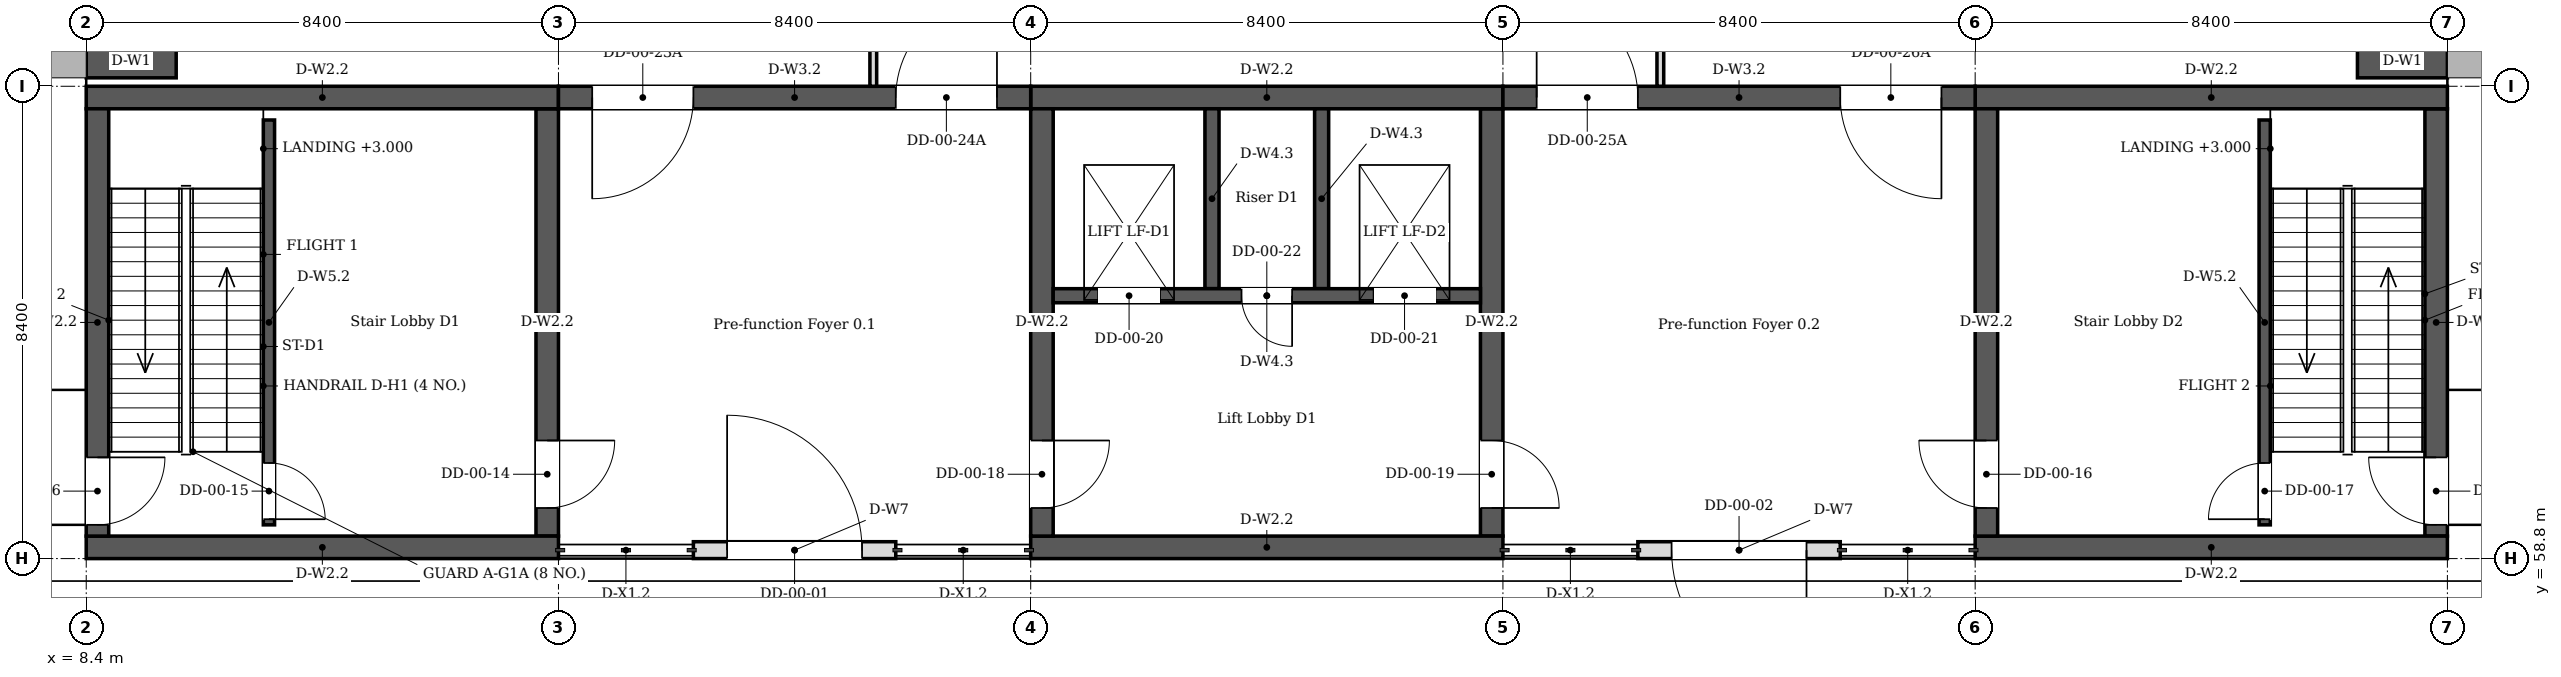
"""IFC4 building model, lengths in metres.
Left out: names, types, materials, properties, quantities, classifications, styles, units other than length and angle.
Written with IfcOpenShell. Run it as: python <this file> out.ifc"""

import sys

from ifc_helpers import new_model, si_unit, direction, frame, frame_2d, origin, place, context, subcontext, project, spatial, rectangle, extrude, element, fill, save


model = new_model("IFC4")
c1 = context("Model", 3, precision=1e-05, world=origin(), true_north=direction((0.0, 1.0)))
c2 = subcontext(c1, "Body", "Model", "MODEL_VIEW")
j1 = project(units=[si_unit("LENGTHUNIT", "METRE"), si_unit("PLANEANGLEUNIT", "RADIAN")], contexts=[c1])
p1 = place(None, origin())
s1 = spatial("IfcSite", under=j1, at=p1, CompositionType="ELEMENT")
p2 = place(p1, origin())
s2 = spatial("IfcBuilding", under=s1, at=p2, CompositionType="ELEMENT")
p3 = place(p2, origin())
s3 = spatial("IfcBuildingStorey", under=s2, at=p3, CompositionType="ELEMENT", Elevation=0.0)
p4 = place(p3, frame((8.4, 67.65, 0.0), z_axis=(0.0, 0.0, 1.0), x_axis=(1.0, 0.0, 0.0)))
e1 = element("IfcWall", 1, at=p4, inside=s3, PredefinedType="SOLIDWALL", context=c2, shape_type="SweptSolid", body=[
    extrude(rectangle(XDim=1.6, YDim=0.6, at=frame_2d((0.8, 0.0))), origin(), (0.0, 0.0, 1.0), 14.467),
])
p5 = place(p3, frame((50.4, 67.65, 0.0), z_axis=(0.0, 0.0, 1.0), x_axis=(-1.0, 0.0, 0.0)))
e2 = element("IfcWall", 2, at=p5, inside=s3, PredefinedType="SOLIDWALL", context=c2, shape_type="SweptSolid", body=[
    extrude(rectangle(XDim=1.6, YDim=0.6, at=frame_2d((0.8, 0.0))), origin(), (0.0, 0.0, 1.0), 14.467),
])
for number, where, z_axis, x_axis in (
    (3, (8.4, 59.0, 0.0), (0.0, 0.0, 1.0), (1.0, 0.0, 0.0)),
    (4, (8.4, 67.0, 0.0), (0.0, 0.0, 1.0), (1.0, 0.0, 0.0)),
):
    element("IfcWall", number, at=place(p3, frame(where, z_axis=z_axis, x_axis=x_axis)), inside=s3, PredefinedType="SOLIDWALL", context=c2, shape_type="SweptSolid", body=[
        extrude(rectangle(XDim=8.4, YDim=0.4, at=frame_2d((4.2, 0.0))), origin(), (0.0, 0.0, 1.0), 5.72),
    ])
p6 = place(p3, frame((8.6, 59.2, 0.0), z_axis=(0.0, 0.0, 1.0), x_axis=(0.0, 1.0, 0.0)))
e5 = element("IfcWall", 5, at=p6, inside=s3, PredefinedType="SOLIDWALL", context=c2, shape_type="SweptSolid", body=[
    extrude(rectangle(XDim=7.6, YDim=0.4, at=frame_2d((3.8, 0.0))), origin(), (0.0, 0.0, 1.0), 5.72),
])
p7 = place(p6, frame((0.2, 0.0, 0.0)))
e6 = element("IfcOpeningElement", 6, at=p7, cuts=e5, PredefinedType="OPENING", context=c2, shape_type="SweptSolid", body=[
    extrude(rectangle(XDim=1.2, YDim=2.1, at=frame_2d((0.6, 1.05))), frame((0.0, 0.21, 0.0), z_axis=(0.0, -1.0, 0.0), x_axis=(1.0, 0.0, 0.0)), (0.0, 0.0, 1.0), 0.42),
])
p8 = place(p3, frame((16.6, 59.2, 0.0), z_axis=(0.0, 0.0, 1.0), x_axis=(0.0, 1.0, 0.0)))
e7 = element("IfcWall", 7, at=p8, inside=s3, PredefinedType="SOLIDWALL", context=c2, shape_type="SweptSolid", body=[
    extrude(rectangle(XDim=7.6, YDim=0.4, at=frame_2d((3.8, 0.0))), origin(), (0.0, 0.0, 1.0), 5.72),
])
p9 = place(p8, frame((0.5, 0.0, 0.0)))
e8 = element("IfcOpeningElement", 8, at=p9, cuts=e7, PredefinedType="OPENING", context=c2, shape_type="SweptSolid", body=[
    extrude(rectangle(XDim=1.2, YDim=2.1, at=frame_2d((0.6, 1.05))), frame((0.0, 0.21, 0.0), z_axis=(0.0, -1.0, 0.0), x_axis=(1.0, 0.0, 0.0)), (0.0, 0.0, 1.0), 0.42),
])
for number, where, z_axis, x_axis in (
    (9, (25.2, 59.0, 0.0), (0.0, 0.0, 1.0), (1.0, 0.0, 0.0)),
    (10, (25.2, 67.0, 0.0), (0.0, 0.0, 1.0), (1.0, 0.0, 0.0)),
):
    element("IfcWall", number, at=place(p3, frame(where, z_axis=z_axis, x_axis=x_axis)), inside=s3, PredefinedType="SOLIDWALL", context=c2, shape_type="SweptSolid", body=[
        extrude(rectangle(XDim=8.4, YDim=0.4, at=frame_2d((4.2, 0.0))), origin(), (0.0, 0.0, 1.0), 5.72),
    ])
p10 = place(p3, frame((25.4, 59.2, 0.0), z_axis=(0.0, 0.0, 1.0), x_axis=(0.0, 1.0, 0.0)))
e11 = element("IfcWall", 11, at=p10, inside=s3, PredefinedType="SOLIDWALL", context=c2, shape_type="SweptSolid", body=[
    extrude(rectangle(XDim=7.6, YDim=0.4, at=frame_2d((3.8, 0.0))), origin(), (0.0, 0.0, 1.0), 5.72),
])
p11 = place(p10, frame((0.5, 0.0, 0.0)))
e12 = element("IfcOpeningElement", 12, at=p11, cuts=e11, PredefinedType="OPENING", context=c2, shape_type="SweptSolid", body=[
    extrude(rectangle(XDim=1.2, YDim=2.1, at=frame_2d((0.6, 1.05))), frame((0.0, 0.21, 0.0), z_axis=(0.0, -1.0, 0.0), x_axis=(1.0, 0.0, 0.0)), (0.0, 0.0, 1.0), 0.42),
])
p12 = place(p3, frame((33.4, 59.2, 0.0), z_axis=(0.0, 0.0, 1.0), x_axis=(0.0, 1.0, 0.0)))
e13 = element("IfcWall", 13, at=p12, inside=s3, PredefinedType="SOLIDWALL", context=c2, shape_type="SweptSolid", body=[
    extrude(rectangle(XDim=7.6, YDim=0.4, at=frame_2d((3.8, 0.0))), origin(), (0.0, 0.0, 1.0), 5.72),
])
p13 = place(p12, frame((0.5, 0.0, 0.0)))
e14 = element("IfcOpeningElement", 14, at=p13, cuts=e13, PredefinedType="OPENING", context=c2, shape_type="SweptSolid", body=[
    extrude(rectangle(XDim=1.2, YDim=2.1, at=frame_2d((0.6, 1.05))), frame((0.0, 0.21, 0.0), z_axis=(0.0, -1.0, 0.0), x_axis=(1.0, 0.0, 0.0)), (0.0, 0.0, 1.0), 0.42),
])
for number, where, z_axis, x_axis in (
    (15, (42.0, 59.0, 0.0), (0.0, 0.0, 1.0), (1.0, 0.0, 0.0)),
    (16, (42.0, 67.0, 0.0), (0.0, 0.0, 1.0), (1.0, 0.0, 0.0)),
):
    element("IfcWall", number, at=place(p3, frame(where, z_axis=z_axis, x_axis=x_axis)), inside=s3, PredefinedType="SOLIDWALL", context=c2, shape_type="SweptSolid", body=[
        extrude(rectangle(XDim=8.4, YDim=0.4, at=frame_2d((4.2, 0.0))), origin(), (0.0, 0.0, 1.0), 5.72),
    ])
p14 = place(p3, frame((42.2, 59.2, 0.0), z_axis=(0.0, 0.0, 1.0), x_axis=(0.0, 1.0, 0.0)))
e17 = element("IfcWall", 17, at=p14, inside=s3, PredefinedType="SOLIDWALL", context=c2, shape_type="SweptSolid", body=[
    extrude(rectangle(XDim=7.6, YDim=0.4, at=frame_2d((3.8, 0.0))), origin(), (0.0, 0.0, 1.0), 5.72),
])
p15 = place(p14, frame((0.5, 0.0, 0.0)))
e18 = element("IfcOpeningElement", 18, at=p15, cuts=e17, PredefinedType="OPENING", context=c2, shape_type="SweptSolid", body=[
    extrude(rectangle(XDim=1.2, YDim=2.1, at=frame_2d((0.6, 1.05))), frame((0.0, 0.21, 0.0), z_axis=(0.0, -1.0, 0.0), x_axis=(1.0, 0.0, 0.0)), (0.0, 0.0, 1.0), 0.42),
])
p16 = place(p3, frame((50.2, 66.8, 0.0), z_axis=(0.0, 0.0, 1.0), x_axis=(0.0, -1.0, 0.0)))
e19 = element("IfcWall", 19, at=p16, inside=s3, PredefinedType="SOLIDWALL", context=c2, shape_type="SweptSolid", body=[
    extrude(rectangle(XDim=7.6, YDim=0.4, at=frame_2d((3.8, 0.0))), origin(), (0.0, 0.0, 1.0), 5.72),
])
p17 = place(p16, frame((6.2, 0.0, 0.0)))
e20 = element("IfcOpeningElement", 20, at=p17, cuts=e19, PredefinedType="OPENING", context=c2, shape_type="SweptSolid", body=[
    extrude(rectangle(XDim=1.2, YDim=2.1, at=frame_2d((0.6, 1.05))), frame((0.0, 0.21, 0.0), z_axis=(0.0, -1.0, 0.0), x_axis=(1.0, 0.0, 0.0)), (0.0, 0.0, 1.0), 0.42),
])
p18 = place(p3, frame((25.6, 63.475, -1.4), z_axis=(0.0, 0.0, 1.0), x_axis=(1.0, 0.0, 0.0)))
e21 = element("IfcWall", 21, at=p18, inside=s3, PredefinedType="SOLIDWALL", context=c2, shape_type="SweptSolid", body=[
    extrude(rectangle(XDim=7.6, YDim=0.25, at=frame_2d((3.8, 0.0))), origin(), (0.0, 0.0, 1.0), 7.12),
])
p19 = place(p18, frame((0.8, 0.0, 1.4)))
e22 = element("IfcOpeningElement", 22, at=p19, cuts=e21, PredefinedType="OPENING", context=c2, shape_type="SweptSolid", body=[
    extrude(rectangle(XDim=1.1, YDim=2.1, at=frame_2d((0.55, 1.05))), frame((0.0, 0.135, 0.0), z_axis=(0.0, -1.0, 0.0), x_axis=(1.0, 0.0, 0.0)), (0.0, 0.0, 1.0), 0.27),
])
p20 = place(p18, frame((5.7, 0.0, 1.4)))
e23 = element("IfcOpeningElement", 23, at=p20, cuts=e21, PredefinedType="OPENING", context=c2, shape_type="SweptSolid", body=[
    extrude(rectangle(XDim=1.1, YDim=2.1, at=frame_2d((0.55, 1.05))), frame((0.0, 0.135, 0.0), z_axis=(0.0, -1.0, 0.0), x_axis=(1.0, 0.0, 0.0)), (0.0, 0.0, 1.0), 0.27),
])
p21 = place(p18, frame((3.35, 0.0, 1.4)))
e24 = element("IfcOpeningElement", 24, at=p21, cuts=e21, PredefinedType="OPENING", context=c2, shape_type="SweptSolid", body=[
    extrude(rectangle(XDim=0.9, YDim=2.1, at=frame_2d((0.45, 1.05))), frame((0.0, 0.135, 0.0), z_axis=(0.0, -1.0, 0.0), x_axis=(1.0, 0.0, 0.0)), (0.0, 0.0, 1.0), 0.27),
])
for number, where, z_axis, x_axis in (
    (25, (28.425, 63.6, -1.4), (0.0, 0.0, 1.0), (0.0, 1.0, 0.0)),
    (26, (30.375, 63.6, -1.4), (0.0, 0.0, 1.0), (0.0, 1.0, 0.0)),
):
    element("IfcWall", number, at=place(p3, frame(where, z_axis=z_axis, x_axis=x_axis)), inside=s3, PredefinedType="SOLIDWALL", context=c2, shape_type="SweptSolid", body=[
        extrude(rectangle(XDim=3.2, YDim=0.25, at=frame_2d((1.6, 0.0))), origin(), (0.0, 0.0, 1.0), 7.12),
    ])
p22 = place(p3, frame((11.65, 59.4, 0.0), z_axis=(0.0, 0.0, 1.0), x_axis=(0.0, 1.0, 0.0)))
e27 = element("IfcWall", 27, at=p22, inside=s3, PredefinedType="SOLIDWALL", context=c2, shape_type="SweptSolid", body=[
    extrude(rectangle(XDim=7.2, YDim=0.2, at=frame_2d((3.6, 0.0))), origin(), (0.0, 0.0, 1.0), 5.72),
])
p23 = place(p22, frame((0.1, 0.0, 0.0)))
e28 = element("IfcOpeningElement", 28, at=p23, cuts=e27, PredefinedType="OPENING", context=c2, shape_type="SweptSolid", body=[
    extrude(rectangle(XDim=1.0, YDim=2.1, at=frame_2d((0.5, 1.05))), frame((0.0, 0.11, 0.0), z_axis=(0.0, -1.0, 0.0), x_axis=(1.0, 0.0, 0.0)), (0.0, 0.0, 1.0), 0.22),
])
p24 = place(p3, frame((47.15, 59.4, 0.0), z_axis=(0.0, 0.0, 1.0), x_axis=(0.0, 1.0, 0.0)))
e29 = element("IfcWall", 29, at=p24, inside=s3, PredefinedType="SOLIDWALL", context=c2, shape_type="SweptSolid", body=[
    extrude(rectangle(XDim=7.2, YDim=0.2, at=frame_2d((3.6, 0.0))), origin(), (0.0, 0.0, 1.0), 5.72),
])
p25 = place(p24, frame((0.1, 0.0, 0.0)))
e30 = element("IfcOpeningElement", 30, at=p25, cuts=e29, PredefinedType="OPENING", context=c2, shape_type="SweptSolid", body=[
    extrude(rectangle(XDim=1.0, YDim=2.1, at=frame_2d((0.5, 1.05))), frame((0.0, 0.11, 0.0), z_axis=(0.0, -1.0, 0.0), x_axis=(1.0, 0.0, 0.0)), (0.0, 0.0, 1.0), 0.22),
])
p26 = place(p3, frame((19.2, 58.95, 0.0), z_axis=(0.0, 0.0, 1.0), x_axis=(1.0, 0.0, 0.0)))
e31 = element("IfcWall", 31, at=p26, inside=s3, PredefinedType="SOLIDWALL", context=c2, shape_type="SweptSolid", body=[
    extrude(rectangle(XDim=3.6, YDim=0.3, at=frame_2d((1.8, 0.0))), origin(), (0.0, 0.0, 1.0), 5.22),
])
p27 = place(p26, frame((0.6, 0.0, 0.0)))
e32 = element("IfcOpeningElement", 32, at=p27, cuts=e31, PredefinedType="OPENING", context=c2, shape_type="SweptSolid", body=[
    extrude(rectangle(XDim=2.4, YDim=2.4, at=frame_2d((1.2, 1.2))), frame((0.0, 0.16, 0.0), z_axis=(0.0, -1.0, 0.0), x_axis=(1.0, 0.0, 0.0)), (0.0, 0.0, 1.0), 0.32),
])
p28 = place(p3, frame((36.0, 58.95, 0.0), z_axis=(0.0, 0.0, 1.0), x_axis=(1.0, 0.0, 0.0)))
e33 = element("IfcWall", 33, at=p28, inside=s3, PredefinedType="SOLIDWALL", context=c2, shape_type="SweptSolid", body=[
    extrude(rectangle(XDim=3.6, YDim=0.3, at=frame_2d((1.8, 0.0))), origin(), (0.0, 0.0, 1.0), 5.22),
])
p29 = place(p28, frame((0.6, 0.0, 0.0)))
e34 = element("IfcOpeningElement", 34, at=p29, cuts=e33, PredefinedType="OPENING", context=c2, shape_type="SweptSolid", body=[
    extrude(rectangle(XDim=2.4, YDim=2.4, at=frame_2d((1.2, 1.2))), frame((0.0, 0.16, 0.0), z_axis=(0.0, -1.0, 0.0), x_axis=(1.0, 0.0, 0.0)), (0.0, 0.0, 1.0), 0.32),
])
for number, where, z_axis, x_axis in (
    (35, (22.4, 67.2, 0.0), (0.0, 0.0, 1.0), (0.0, 1.0, 0.0)),
    (36, (36.4, 67.2, 0.0), (0.0, 0.0, 1.0), (0.0, 1.0, 0.0)),
):
    element("IfcWall", number, at=place(p3, frame(where, z_axis=z_axis, x_axis=x_axis)), inside=s3, PredefinedType="MOVABLE", context=c2, shape_type="SweptSolid", body=[
        extrude(rectangle(XDim=33.6, YDim=0.12, at=frame_2d((16.8, 0.0))), origin(), (0.0, 0.0, 1.0), 14.467),
    ])
p30 = place(p3, frame((16.8, 67.0, 0.0), z_axis=(0.0, 0.0, 1.0), x_axis=(1.0, 0.0, 0.0)))
e37 = element("IfcWall", 37, at=p30, inside=s3, PredefinedType="SOLIDWALL", context=c2, shape_type="SweptSolid", body=[
    extrude(rectangle(XDim=8.4, YDim=0.4, at=frame_2d((4.2, 0.0))), origin(), (0.0, 0.0, 1.0), 5.22),
])
p31 = place(p30, frame((0.6, 0.0, 0.0)))
e38 = element("IfcOpeningElement", 38, at=p31, cuts=e37, PredefinedType="OPENING", context=c2, shape_type="SweptSolid", body=[
    extrude(rectangle(XDim=1.8, YDim=2.4, at=frame_2d((0.9, 1.2))), frame((0.0, 0.21, 0.0), z_axis=(0.0, -1.0, 0.0), x_axis=(1.0, 0.0, 0.0)), (0.0, 0.0, 1.0), 0.42),
])
p32 = place(p30, frame((6.0, 0.0, 0.0)))
e39 = element("IfcOpeningElement", 39, at=p32, cuts=e37, PredefinedType="OPENING", context=c2, shape_type="SweptSolid", body=[
    extrude(rectangle(XDim=1.8, YDim=2.4, at=frame_2d((0.9, 1.2))), frame((0.0, 0.21, 0.0), z_axis=(0.0, -1.0, 0.0), x_axis=(1.0, 0.0, 0.0)), (0.0, 0.0, 1.0), 0.42),
])
p33 = place(p3, frame((33.6, 67.0, 0.0), z_axis=(0.0, 0.0, 1.0), x_axis=(1.0, 0.0, 0.0)))
e40 = element("IfcWall", 40, at=p33, inside=s3, PredefinedType="SOLIDWALL", context=c2, shape_type="SweptSolid", body=[
    extrude(rectangle(XDim=8.4, YDim=0.4, at=frame_2d((4.2, 0.0))), origin(), (0.0, 0.0, 1.0), 5.22),
])
p34 = place(p33, frame((0.6, 0.0, 0.0)))
e41 = element("IfcOpeningElement", 41, at=p34, cuts=e40, PredefinedType="OPENING", context=c2, shape_type="SweptSolid", body=[
    extrude(rectangle(XDim=1.8, YDim=2.4, at=frame_2d((0.9, 1.2))), frame((0.0, 0.21, 0.0), z_axis=(0.0, -1.0, 0.0), x_axis=(1.0, 0.0, 0.0)), (0.0, 0.0, 1.0), 0.42),
])
p35 = place(p33, frame((6.0, 0.0, 0.0)))
e42 = element("IfcOpeningElement", 42, at=p35, cuts=e40, PredefinedType="OPENING", context=c2, shape_type="SweptSolid", body=[
    extrude(rectangle(XDim=1.8, YDim=2.4, at=frame_2d((0.9, 1.2))), frame((0.0, 0.21, 0.0), z_axis=(0.0, -1.0, 0.0), x_axis=(1.0, 0.0, 0.0)), (0.0, 0.0, 1.0), 0.42),
])
p36 = place(p27, origin())
e43 = element("IfcDoor", 43, at=p36, inside=s3, OperationType="DOUBLE_DOOR_SINGLE_SWING", PredefinedType="DOOR", context=c2, shape_type="SweptSolid", body=[
    extrude(rectangle(XDim=2.4, YDim=2.4, at=frame_2d((1.2, 1.2))), frame((0.0, 0.025, 0.0), z_axis=(0.0, -1.0, 0.0), x_axis=(1.0, 0.0, 0.0)), (0.0, 0.0, 1.0), 0.05),
])
fill(e32, e43)
p37 = place(p29, origin())
e44 = element("IfcDoor", 44, at=p37, inside=s3, OperationType="DOUBLE_DOOR_SINGLE_SWING", PredefinedType="DOOR", context=c2, shape_type="SweptSolid", body=[
    extrude(rectangle(XDim=2.4, YDim=2.4, at=frame_2d((1.2, 1.2))), frame((0.0, 0.025, 0.0), z_axis=(0.0, -1.0, 0.0), x_axis=(1.0, 0.0, 0.0)), (0.0, 0.0, 1.0), 0.05),
])
fill(e34, e44)
p38 = place(p7, origin())
e45 = element("IfcDoor", 45, at=p38, inside=s3, OperationType="SINGLE_SWING_LEFT", PredefinedType="DOOR", context=c2, shape_type="SweptSolid", body=[
    extrude(rectangle(XDim=1.2, YDim=2.1, at=frame_2d((0.6, 1.05))), frame((0.0, 0.025, 0.0), z_axis=(0.0, -1.0, 0.0), x_axis=(1.0, 0.0, 0.0)), (0.0, 0.0, 1.0), 0.05),
])
fill(e6, e45)
p39 = place(p17, origin())
e46 = element("IfcDoor", 46, at=p39, inside=s3, OperationType="SINGLE_SWING_LEFT", PredefinedType="DOOR", context=c2, shape_type="SweptSolid", body=[
    extrude(rectangle(XDim=1.2, YDim=2.1, at=frame_2d((0.6, 1.05))), frame((0.0, 0.025, 0.0), z_axis=(0.0, -1.0, 0.0), x_axis=(1.0, 0.0, 0.0)), (0.0, 0.0, 1.0), 0.05),
])
fill(e20, e46)
p40 = place(p9, origin())
e47 = element("IfcDoor", 47, at=p40, inside=s3, OperationType="SINGLE_SWING_LEFT", PredefinedType="DOOR", context=c2, shape_type="SweptSolid", body=[
    extrude(rectangle(XDim=1.2, YDim=2.1, at=frame_2d((0.6, 1.05))), frame((0.0, 0.025, 0.0), z_axis=(0.0, -1.0, 0.0), x_axis=(1.0, 0.0, 0.0)), (0.0, 0.0, 1.0), 0.05),
])
fill(e8, e47)
p41 = place(p23, origin())
e48 = element("IfcDoor", 48, at=p41, inside=s3, OperationType="SINGLE_SWING_LEFT", PredefinedType="DOOR", context=c2, shape_type="SweptSolid", body=[
    extrude(rectangle(XDim=1.0, YDim=2.1, at=frame_2d((0.5, 1.05))), frame((0.0, 0.025, 0.0), z_axis=(0.0, -1.0, 0.0), x_axis=(1.0, 0.0, 0.0)), (0.0, 0.0, 1.0), 0.05),
])
fill(e28, e48)
p42 = place(p15, origin())
e49 = element("IfcDoor", 49, at=p42, inside=s3, OperationType="SINGLE_SWING_LEFT", PredefinedType="DOOR", context=c2, shape_type="SweptSolid", body=[
    extrude(rectangle(XDim=1.2, YDim=2.1, at=frame_2d((0.6, 1.05))), frame((0.0, 0.025, 0.0), z_axis=(0.0, -1.0, 0.0), x_axis=(1.0, 0.0, 0.0)), (0.0, 0.0, 1.0), 0.05),
])
fill(e18, e49)
p43 = place(p25, origin())
e50 = element("IfcDoor", 50, at=p43, inside=s3, OperationType="SINGLE_SWING_LEFT", PredefinedType="DOOR", context=c2, shape_type="SweptSolid", body=[
    extrude(rectangle(XDim=1.0, YDim=2.1, at=frame_2d((0.5, 1.05))), frame((0.0, 0.025, 0.0), z_axis=(0.0, -1.0, 0.0), x_axis=(1.0, 0.0, 0.0)), (0.0, 0.0, 1.0), 0.05),
])
fill(e30, e50)
p44 = place(p11, origin())
e51 = element("IfcDoor", 51, at=p44, inside=s3, OperationType="SINGLE_SWING_LEFT", PredefinedType="DOOR", context=c2, shape_type="SweptSolid", body=[
    extrude(rectangle(XDim=1.2, YDim=2.1, at=frame_2d((0.6, 1.05))), frame((0.0, 0.025, 0.0), z_axis=(0.0, -1.0, 0.0), x_axis=(1.0, 0.0, 0.0)), (0.0, 0.0, 1.0), 0.05),
])
fill(e12, e51)
p45 = place(p13, origin())
e52 = element("IfcDoor", 52, at=p45, inside=s3, OperationType="SINGLE_SWING_LEFT", PredefinedType="DOOR", context=c2, shape_type="SweptSolid", body=[
    extrude(rectangle(XDim=1.2, YDim=2.1, at=frame_2d((0.6, 1.05))), frame((0.0, 0.025, 0.0), z_axis=(0.0, -1.0, 0.0), x_axis=(1.0, 0.0, 0.0)), (0.0, 0.0, 1.0), 0.05),
])
fill(e14, e52)
p46 = place(p19, origin())
e53 = element("IfcDoor", 53, at=p46, inside=s3, OperationType="DOUBLE_DOOR_SLIDING", PredefinedType="DOOR", context=c2, shape_type="SweptSolid", body=[
    extrude(rectangle(XDim=1.1, YDim=2.1, at=frame_2d((0.55, 1.05))), frame((0.0, 0.025, 0.0), z_axis=(0.0, -1.0, 0.0), x_axis=(1.0, 0.0, 0.0)), (0.0, 0.0, 1.0), 0.05),
])
fill(e22, e53)
p47 = place(p20, origin())
e54 = element("IfcDoor", 54, at=p47, inside=s3, OperationType="DOUBLE_DOOR_SLIDING", PredefinedType="DOOR", context=c2, shape_type="SweptSolid", body=[
    extrude(rectangle(XDim=1.1, YDim=2.1, at=frame_2d((0.55, 1.05))), frame((0.0, 0.025, 0.0), z_axis=(0.0, -1.0, 0.0), x_axis=(1.0, 0.0, 0.0)), (0.0, 0.0, 1.0), 0.05),
])
fill(e23, e54)
p48 = place(p21, origin())
e55 = element("IfcDoor", 55, at=p48, inside=s3, OperationType="SINGLE_SWING_LEFT", PredefinedType="DOOR", context=c2, shape_type="SweptSolid", body=[
    extrude(rectangle(XDim=0.9, YDim=2.1, at=frame_2d((0.45, 1.05))), frame((0.0, 0.025, 0.0), z_axis=(0.0, -1.0, 0.0), x_axis=(1.0, 0.0, 0.0)), (0.0, 0.0, 1.0), 0.05),
])
fill(e24, e55)
p49 = place(p31, origin())
e56 = element("IfcDoor", 56, at=p49, inside=s3, OperationType="DOUBLE_DOOR_SINGLE_SWING", PredefinedType="DOOR", context=c2, shape_type="SweptSolid", body=[
    extrude(rectangle(XDim=1.8, YDim=2.4, at=frame_2d((0.9, 1.2))), frame((0.0, 0.025, 0.0), z_axis=(0.0, -1.0, 0.0), x_axis=(1.0, 0.0, 0.0)), (0.0, 0.0, 1.0), 0.05),
])
fill(e38, e56)
p50 = place(p32, origin())
e57 = element("IfcDoor", 57, at=p50, inside=s3, OperationType="DOUBLE_DOOR_SINGLE_SWING", PredefinedType="DOOR", context=c2, shape_type="SweptSolid", body=[
    extrude(rectangle(XDim=1.8, YDim=2.4, at=frame_2d((0.9, 1.2))), frame((0.0, 0.025, 0.0), z_axis=(0.0, -1.0, 0.0), x_axis=(1.0, 0.0, 0.0)), (0.0, 0.0, 1.0), 0.05),
])
fill(e39, e57)
p51 = place(p34, origin())
e58 = element("IfcDoor", 58, at=p51, inside=s3, OperationType="DOUBLE_DOOR_SINGLE_SWING", PredefinedType="DOOR", context=c2, shape_type="SweptSolid", body=[
    extrude(rectangle(XDim=1.8, YDim=2.4, at=frame_2d((0.9, 1.2))), frame((0.0, 0.025, 0.0), z_axis=(0.0, -1.0, 0.0), x_axis=(1.0, 0.0, 0.0)), (0.0, 0.0, 1.0), 0.05),
])
fill(e41, e58)
p52 = place(p35, origin())
e59 = element("IfcDoor", 59, at=p52, inside=s3, OperationType="DOUBLE_DOOR_SINGLE_SWING", PredefinedType="DOOR", context=c2, shape_type="SweptSolid", body=[
    extrude(rectangle(XDim=1.8, YDim=2.4, at=frame_2d((0.9, 1.2))), frame((0.0, 0.025, 0.0), z_axis=(0.0, -1.0, 0.0), x_axis=(1.0, 0.0, 0.0)), (0.0, 0.0, 1.0), 0.05),
])
fill(e42, e59)
save(model, sys.argv[1])
